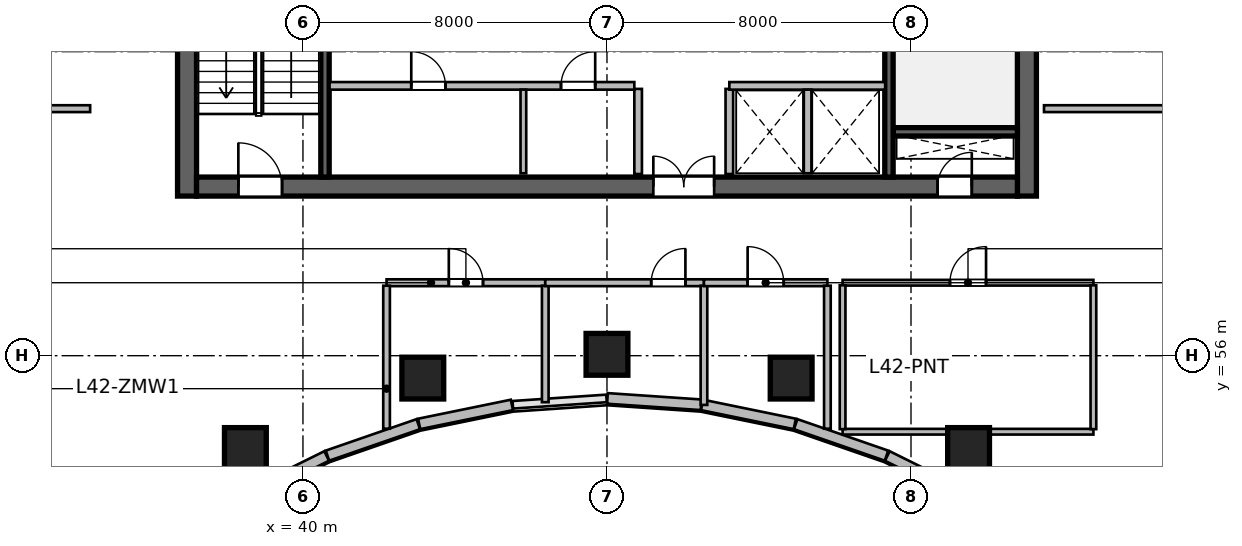
"""IFC4 building model, lengths in metres.
Left out: names, types, materials, properties, quantities, classifications, styles, units other than length and angle.
Written with IfcOpenShell. Run it as: python <this file> out.ifc"""

import sys

from ifc_helpers import new_model, si_unit, direction, frame, frame_2d, origin, origin_2d, place, context, subcontext, project, spatial, rectangle, circle, extrude, source, transform, mapped, element, fill, save


model = new_model("IFC4")
c1 = context("Model", 3, precision=1e-05, world=origin(), true_north=direction((0.0, 1.0)))
c2 = subcontext(c1, "Body", "Model", "MODEL_VIEW")
j1 = project(units=[si_unit("LENGTHUNIT", "METRE"), si_unit("PLANEANGLEUNIT", "RADIAN")], contexts=[c1])
p1 = place(None, origin())
s1 = spatial("IfcSite", under=j1, at=p1, CompositionType="ELEMENT")
p2 = place(p1, origin())
s2 = spatial("IfcBuilding", under=s1, at=p2, CompositionType="ELEMENT")
p3 = place(p2, frame((0.0, 0.0, 174.0)))
s3 = spatial("IfcBuildingStorey", under=s2, at=p3, CompositionType="ELEMENT", Elevation=174.0)
m1 = source(origin(), c2, "Body", "SweptSolid", [
    extrude(rectangle(XDim=12.0, YDim=0.5, at=frame_2d((6.0, 0.0))), origin(), (0.0, 0.0, 1.0), 3.9),
])
for number, where, z_axis, x_axis in (
    (1, (36.95, 60.2, 0.0), (0.0, 0.0, 1.0), (0.0, 1.0, 0.0)),
    (2, (59.05, 60.2, 0.0), (0.0, 0.0, 1.0), (0.0, 1.0, 0.0)),
):
    element("IfcWall", number, at=place(p3, frame(where, z_axis=z_axis, x_axis=x_axis)), inside=s3, PredefinedType="SHEAR", context=c2, shape_type="MappedRepresentation", body=[
        mapped(m1, transform((0.0, 0.0, 0.0), scale=1.0)),
    ])
m2 = source(origin(), c2, "Body", "SweptSolid", [
    extrude(rectangle(XDim=21.6, YDim=0.5, at=frame_2d((10.8, 0.0))), origin(), (0.0, 0.0, 1.0), 3.9),
])
p4 = place(p3, frame((37.2, 60.45, 0.0), z_axis=(0.0, 0.0, 1.0), x_axis=(1.0, 0.0, 0.0)))
e3 = element("IfcWall", 3, at=p4, inside=s3, PredefinedType="SHEAR", context=c2, shape_type="MappedRepresentation", body=[
    mapped(m2, transform((0.0, 0.0, 0.0), scale=1.0)),
])
p5 = place(p4, frame((1.1, 0.0, 0.0)))
e4 = element("IfcOpeningElement", 4, at=p5, cuts=e3, PredefinedType="OPENING", context=c2, shape_type="SweptSolid", body=[
    extrude(rectangle(XDim=1.15, YDim=2.15, at=frame_2d((0.575, 1.075))), frame((0.0, 0.26, 0.0), z_axis=(0.0, -1.0, 0.0), x_axis=(1.0, 0.0, 0.0)), (0.0, 0.0, 1.0), 0.52),
])
p6 = place(p4, frame((19.5, 0.0, 0.0)))
e5 = element("IfcOpeningElement", 5, at=p6, cuts=e3, PredefinedType="OPENING", context=c2, shape_type="SweptSolid", body=[
    extrude(rectangle(XDim=0.9, YDim=2.1, at=frame_2d((0.45, 1.05))), frame((0.0, 0.26, 0.0), z_axis=(0.0, -1.0, 0.0), x_axis=(1.0, 0.0, 0.0)), (0.0, 0.0, 1.0), 0.52),
])
p7 = place(p4, frame((12.02, 0.0, 0.0)))
e6 = element("IfcOpeningElement", 6, at=p7, cuts=e3, PredefinedType="OPENING", context=c2, shape_type="SweptSolid", body=[
    extrude(rectangle(XDim=1.6, YDim=2.15, at=frame_2d((0.8, 1.075))), frame((0.0, 0.26, 0.0), z_axis=(0.0, -1.0, 0.0), x_axis=(1.0, 0.0, 0.0)), (0.0, 0.0, 1.0), 0.52),
])
m3 = source(origin(), c2, "Body", "SweptSolid", [
    extrude(rectangle(XDim=3.27, YDim=0.22, at=frame_2d((1.635, 0.0))), origin(), (0.0, 0.0, 1.0), 3.9),
])
p8 = place(p3, frame((55.53, 61.89, 0.0), z_axis=(0.0, 0.0, 1.0), x_axis=(1.0, 0.0, 0.0)))
e7 = element("IfcWall", 7, at=p8, inside=s3, PredefinedType="SHEAR", context=c2, shape_type="MappedRepresentation", body=[
    mapped(m3, transform((0.0, 0.0, 0.0), scale=1.0)),
])
m4 = source(origin(), c2, "Body", "SweptSolid", [
    extrude(rectangle(XDim=11.0, YDim=0.22, at=frame_2d((5.5, 0.0))), origin(), (0.0, 0.0, 1.0), 3.9),
])
p9 = place(p3, frame((40.58, 60.7, 0.0), z_axis=(0.0, 0.0, 1.0), x_axis=(0.0, 1.0, 0.0)))
e8 = element("IfcWall", 8, at=p9, inside=s3, PredefinedType="SHEAR", context=c2, shape_type="MappedRepresentation", body=[
    mapped(m4, transform((0.0, 0.0, 0.0), scale=1.0)),
])
p10 = place(p3, frame((55.42, 60.7, 0.0), z_axis=(0.0, 0.0, 1.0), x_axis=(0.0, 1.0, 0.0)))
e9 = element("IfcWall", 9, at=p10, inside=s3, PredefinedType="SHEAR", context=c2, shape_type="MappedRepresentation", body=[
    mapped(m4, transform((0.0, 0.0, 0.0), scale=1.0)),
])
p11 = place(p10, frame((9.545, 0.0, 0.0)))
e10 = element("IfcOpeningElement", 10, at=p11, cuts=e9, PredefinedType="OPENING", context=c2, shape_type="SweptSolid", body=[
    extrude(rectangle(XDim=1.15, YDim=2.15, at=frame_2d((0.575, 1.075))), frame((0.0, 0.12, 0.0), z_axis=(0.0, -1.0, 0.0), x_axis=(1.0, 0.0, 0.0)), (0.0, 0.0, 1.0), 0.24),
])
m5 = source(origin(), c2, "Body", "SweptSolid", [
    extrude(circle(Radius=0.55, at=origin_2d()), origin(), (0.0, 0.0, 1.0), 3.9),
])
for number, where, z_axis, x_axis in (
    (11, (38.485, 53.558, 0.0), (0.0, 0.0, 1.0), (-0.289, 0.957, 0.0)),
    (12, (43.154, 55.411, 0.0), (0.0, 0.0, 1.0), (-0.143, 0.99, 0.0)),
    (13, (48.0, 56.036, 0.0), (0.0, 0.0, 1.0), (0.0, 1.0, 0.0)),
    (14, (52.846, 55.411, 0.0), (0.0, 0.0, 1.0), (0.143, 0.99, 0.0)),
    (15, (57.515, 53.558, 0.0), (0.0, 0.0, 1.0), (0.289, 0.957, 0.0)),
):
    element("IfcColumn", number, at=place(p3, frame(where, z_axis=z_axis, x_axis=x_axis)), inside=s3, PredefinedType="COLUMN", context=c2, shape_type="MappedRepresentation", body=[
        mapped(m5, transform((0.0, 0.0, 0.0), scale=1.0)),
    ])
m6 = source(origin(), c2, "Body", "SweptSolid", [
    extrude(rectangle(XDim=2.584, YDim=0.28, at=frame_2d((1.292, 0.0))), origin(), (0.0, 0.0, 1.0), 3.65),
])
p12 = place(p3, frame((57.692, 52.213, 0.0), z_axis=(0.0, 0.0, 1.0), x_axis=(-0.895989792847, 0.44407464588, 0.0)))
e16 = element("IfcWall", 16, at=p12, inside=s3, PredefinedType="SOLIDWALL", context=c2, shape_type="MappedRepresentation", body=[
    mapped(m6, transform((0.0, 0.0, 0.0), scale=1.0)),
])
m7 = source(origin(), c2, "Body", "SweptSolid", [
    extrude(rectangle(XDim=2.53, YDim=0.28, at=frame_2d((1.265, 0.0))), origin(), (0.0, 0.0, 1.0), 3.65),
])
p13 = place(p3, frame((55.355, 53.37, 0.0), z_axis=(0.0, 0.0, 1.0), x_axis=(-0.944872429646, 0.327438683872, 0.0)))
e17 = element("IfcWall", 17, at=p13, inside=s3, PredefinedType="SOLIDWALL", context=c2, shape_type="MappedRepresentation", body=[
    mapped(m7, transform((0.0, 0.0, 0.0), scale=1.0)),
])
m8 = source(origin(), c2, "Body", "SweptSolid", [
    extrude(rectangle(XDim=2.491, YDim=0.28, at=frame_2d((1.246, 0.0))), origin(), (0.0, 0.0, 1.0), 3.65),
])
p14 = place(p3, frame((52.942, 54.205, 0.0), z_axis=(0.0, 0.0, 1.0), x_axis=(-0.979630885979, 0.200806691214, 0.0)))
e18 = element("IfcWall", 18, at=p14, inside=s3, PredefinedType="SOLIDWALL", context=c2, shape_type="MappedRepresentation", body=[
    mapped(m8, transform((0.0, 0.0, 0.0), scale=1.0)),
])
m9 = source(origin(), c2, "Body", "SweptSolid", [
    extrude(rectangle(XDim=2.471, YDim=0.28, at=frame_2d((1.236, 0.0))), origin(), (0.0, 0.0, 1.0), 3.65),
])
p15 = place(p3, frame((50.478, 54.708, 0.0), z_axis=(0.0, 0.0, 1.0), x_axis=(-0.997708006929, 0.067666335123, 0.0)))
e19 = element("IfcWall", 19, at=p15, inside=s3, PredefinedType="SOLIDWALL", context=c2, shape_type="MappedRepresentation", body=[
    mapped(m9, transform((0.0, 0.0, 0.0), scale=1.0)),
])
p16 = place(p3, frame((45.498, 54.705, 0.0), z_axis=(0.0, 0.0, 1.0), x_axis=(-0.979630885979, -0.200806691214, 0.0)))
e20 = element("IfcWall", 20, at=p16, inside=s3, PredefinedType="SOLIDWALL", context=c2, shape_type="MappedRepresentation", body=[
    mapped(m8, transform((0.0, 0.0, 0.0), scale=1.0)),
])
p17 = place(p3, frame((43.035, 54.198, 0.0), z_axis=(0.0, 0.0, 1.0), x_axis=(-0.944872429646, -0.327438683872, 0.0)))
e21 = element("IfcWall", 21, at=p17, inside=s3, PredefinedType="SOLIDWALL", context=c2, shape_type="MappedRepresentation", body=[
    mapped(m7, transform((0.0, 0.0, 0.0), scale=1.0)),
])
p18 = place(p3, frame((40.624, 53.361, 0.0), z_axis=(0.0, 0.0, 1.0), x_axis=(-0.895989792847, -0.44407464588, 0.0)))
e22 = element("IfcWall", 22, at=p18, inside=s3, PredefinedType="SOLIDWALL", context=c2, shape_type="MappedRepresentation", body=[
    mapped(m6, transform((0.0, 0.0, 0.0), scale=1.0)),
])
m10 = source(origin(), c2, "Body", "SweptSolid", [
    extrude(rectangle(XDim=2.24, YDim=0.2, at=frame_2d((1.12, 0.0))), origin(), (0.0, 0.0, 1.0), 3.65),
])
for number, where, z_axis, x_axis in (
    (23, (48.82, 60.78, 0.0), (0.0, 0.0, 1.0), (0.0, 1.0, 0.0)),
    (24, (51.22, 60.78, 0.0), (0.0, 0.0, 1.0), (0.0, 1.0, 0.0)),
):
    element("IfcWall", number, at=place(p3, frame(where, z_axis=z_axis, x_axis=x_axis)), inside=s3, PredefinedType="SOLIDWALL", context=c2, shape_type="MappedRepresentation", body=[
        mapped(m10, transform((0.0, 0.0, 0.0), scale=1.0)),
    ])
m11 = source(origin(), c2, "Body", "SweptSolid", [
    extrude(rectangle(XDim=8.02, YDim=0.2, at=frame_2d((4.01, 0.0))), origin(), (0.0, 0.0, 1.0), 3.65),
])
p19 = place(p3, frame((40.7, 63.1, 0.0), z_axis=(0.0, 0.0, 1.0), x_axis=(1.0, 0.0, 0.0)))
e25 = element("IfcWall", 25, at=p19, inside=s3, PredefinedType="SOLIDWALL", context=c2, shape_type="MappedRepresentation", body=[
    mapped(m11, transform((0.0, 0.0, 0.0), scale=1.0)),
])
p20 = place(p19, frame((2.15, 0.0, 0.0)))
e26 = element("IfcOpeningElement", 26, at=p20, cuts=e25, PredefinedType="OPENING", context=c2, shape_type="SweptSolid", body=[
    extrude(rectangle(XDim=0.9, YDim=2.1, at=frame_2d((0.45, 1.05))), frame((0.0, 0.11, 0.0), z_axis=(0.0, -1.0, 0.0), x_axis=(1.0, 0.0, 0.0)), (0.0, 0.0, 1.0), 0.22),
])
p21 = place(p19, frame((6.09, 0.0, 0.0)))
e27 = element("IfcOpeningElement", 27, at=p21, cuts=e25, PredefinedType="OPENING", context=c2, shape_type="SweptSolid", body=[
    extrude(rectangle(XDim=0.9, YDim=2.1, at=frame_2d((0.45, 1.05))), frame((0.0, 0.11, 0.0), z_axis=(0.0, -1.0, 0.0), x_axis=(1.0, 0.0, 0.0)), (0.0, 0.0, 1.0), 0.22),
])
m12 = source(origin(), c2, "Body", "SweptSolid", [
    extrude(rectangle(XDim=4.1, YDim=0.2, at=frame_2d((2.05, 0.0))), origin(), (0.0, 0.0, 1.0), 3.65),
])
p22 = place(p3, frame((51.22, 63.1, 0.0), z_axis=(0.0, 0.0, 1.0), x_axis=(1.0, 0.0, 0.0)))
e28 = element("IfcWall", 28, at=p22, inside=s3, PredefinedType="SOLIDWALL", context=c2, shape_type="MappedRepresentation", body=[
    mapped(m12, transform((0.0, 0.0, 0.0), scale=1.0)),
])
m13 = source(origin(), c2, "Body", "SweptSolid", [
    extrude(rectangle(XDim=2.2, YDim=0.15, at=frame_2d((1.1, 0.0))), origin(), (0.0, 0.0, 1.0), 3.65),
])
p23 = place(p3, frame((45.8, 60.8, 0.0), z_axis=(0.0, 0.0, 1.0), x_axis=(0.0, 1.0, 0.0)))
e29 = element("IfcWall", 29, at=p23, inside=s3, PredefinedType="PARTITIONING", context=c2, shape_type="MappedRepresentation", body=[
    mapped(m13, transform((0.0, 0.0, 0.0), scale=1.0)),
])
m14 = source(origin(), c2, "Body", "SweptSolid", [
    extrude(rectangle(XDim=2.2, YDim=0.2, at=frame_2d((1.1, 0.0))), origin(), (0.0, 0.0, 1.0), 3.65),
])
p24 = place(p3, frame((53.28, 60.8, 0.0), z_axis=(0.0, 0.0, 1.0), x_axis=(0.0, 1.0, 0.0)))
e30 = element("IfcWall", 30, at=p24, inside=s3, PredefinedType="SOLIDWALL", context=c2, shape_type="MappedRepresentation", body=[
    mapped(m14, transform((0.0, 0.0, 0.0), scale=1.0)),
])
m15 = source(origin(), c2, "Body", "SweptSolid", [
    extrude(rectangle(XDim=4.176, YDim=0.18, at=frame_2d((2.088, 0.0))), origin(), (0.0, 0.0, 1.0), 3.65),
])
p25 = place(p3, frame((42.2, 57.92, 0.0), z_axis=(0.0, 0.0, 1.0), x_axis=(1.0, 0.0, 0.0)))
e31 = element("IfcWall", 31, at=p25, inside=s3, PredefinedType="PLUMBINGWALL", context=c2, shape_type="MappedRepresentation", body=[
    mapped(m15, transform((0.0, 0.0, 0.0), scale=1.0)),
])
p26 = place(p25, frame((1.638, 0.0, 0.0)))
e32 = element("IfcOpeningElement", 32, at=p26, cuts=e31, PredefinedType="OPENING", context=c2, shape_type="SweptSolid", body=[
    extrude(rectangle(XDim=0.9, YDim=2.08, at=frame_2d((0.45, 1.04))), frame((0.0, 0.1, 0.0), z_axis=(0.0, -1.0, 0.0), x_axis=(1.0, 0.0, 0.0)), (0.0, 0.0, 1.0), 0.2),
])
m16 = source(origin(), c2, "Body", "SweptSolid", [
    extrude(rectangle(XDim=3.763, YDim=0.175, at=frame_2d((1.881, 0.0))), origin(), (0.0, 0.0, 1.0), 3.65),
])
p27 = place(p3, frame((42.2, 54.079, 0.0), z_axis=(0.0, 0.0, 1.0), x_axis=(0.0, 1.0, 0.0)))
e33 = element("IfcWall", 33, at=p27, inside=s3, PredefinedType="PARTITIONING", context=c2, shape_type="MappedRepresentation", body=[
    mapped(m16, transform((0.0, 0.0, 0.0), scale=1.0)),
])
m17 = source(origin(), c2, "Body", "SweptSolid", [
    extrude(rectangle(XDim=3.065, YDim=0.175, at=frame_2d((1.533, 0.0))), origin(), (0.0, 0.0, 1.0), 3.65),
])
p28 = place(p3, frame((46.376, 54.776, 0.0), z_axis=(0.0, 0.0, 1.0), x_axis=(0.0, 1.0, 0.0)))
e34 = element("IfcWall", 34, at=p28, inside=s3, PredefinedType="PARTITIONING", context=c2, shape_type="MappedRepresentation", body=[
    mapped(m17, transform((0.0, 0.0, 0.0), scale=1.0)),
])
p29 = place(p3, frame((46.376, 57.92, 0.0), z_axis=(0.0, 0.0, 1.0), x_axis=(1.0, 0.0, 0.0)))
e35 = element("IfcWall", 35, at=p29, inside=s3, PredefinedType="PLUMBINGWALL", context=c2, shape_type="MappedRepresentation", body=[
    mapped(m15, transform((0.0, 0.0, 0.0), scale=1.0)),
])
p30 = place(p29, frame((2.788, 0.0, 0.0)))
e36 = element("IfcOpeningElement", 36, at=p30, cuts=e35, PredefinedType="OPENING", context=c2, shape_type="SweptSolid", body=[
    extrude(rectangle(XDim=0.9, YDim=2.08, at=frame_2d((0.45, 1.04))), frame((0.0, 0.1, 0.0), z_axis=(0.0, -1.0, 0.0), x_axis=(1.0, 0.0, 0.0)), (0.0, 0.0, 1.0), 0.2),
])
m18 = source(origin(), c2, "Body", "SweptSolid", [
    extrude(rectangle(XDim=3.136, YDim=0.175, at=frame_2d((1.568, 0.0))), origin(), (0.0, 0.0, 1.0), 3.65),
])
p31 = place(p3, frame((50.552, 54.705, 0.0), z_axis=(0.0, 0.0, 1.0), x_axis=(0.0, 1.0, 0.0)))
e37 = element("IfcWall", 37, at=p31, inside=s3, PredefinedType="PARTITIONING", context=c2, shape_type="MappedRepresentation", body=[
    mapped(m18, transform((0.0, 0.0, 0.0), scale=1.0)),
])
m19 = source(origin(), c2, "Body", "SweptSolid", [
    extrude(rectangle(XDim=3.248, YDim=0.18, at=frame_2d((1.624, 0.0))), origin(), (0.0, 0.0, 1.0), 3.65),
])
p32 = place(p3, frame((50.552, 57.92, 0.0), z_axis=(0.0, 0.0, 1.0), x_axis=(1.0, 0.0, 0.0)))
e38 = element("IfcWall", 38, at=p32, inside=s3, PredefinedType="PLUMBINGWALL", context=c2, shape_type="MappedRepresentation", body=[
    mapped(m19, transform((0.0, 0.0, 0.0), scale=1.0)),
])
p33 = place(p32, frame((1.149, 0.0, 0.0)))
e39 = element("IfcOpeningElement", 39, at=p33, cuts=e38, PredefinedType="OPENING", context=c2, shape_type="SweptSolid", body=[
    extrude(rectangle(XDim=0.95, YDim=2.12, at=frame_2d((0.475, 1.06))), frame((0.0, 0.1, 0.0), z_axis=(0.0, -1.0, 0.0), x_axis=(1.0, 0.0, 0.0)), (0.0, 0.0, 1.0), 0.2),
])
p34 = place(p3, frame((53.8, 54.079, 0.0), z_axis=(0.0, 0.0, 1.0), x_axis=(0.0, 1.0, 0.0)))
e40 = element("IfcWall", 40, at=p34, inside=s3, PredefinedType="PARTITIONING", context=c2, shape_type="MappedRepresentation", body=[
    mapped(m16, transform((0.0, 0.0, 0.0), scale=1.0)),
])
m20 = source(origin(), c2, "Body", "SweptSolid", [
    extrude(rectangle(XDim=6.6, YDim=0.15, at=frame_2d((3.3, 0.0))), origin(), (0.0, 0.0, 1.0), 3.095),
])
p35 = place(p3, frame((54.2, 54.0, 0.0), z_axis=(0.0, 0.0, 1.0), x_axis=(1.0, 0.0, 0.0)))
e41 = element("IfcWall", 41, at=p35, inside=s3, PredefinedType="PARTITIONING", context=c2, shape_type="MappedRepresentation", body=[
    mapped(m20, transform((0.0, 0.0, 0.0), scale=1.0)),
])
m21 = source(origin(), c2, "Body", "SweptSolid", [
    extrude(rectangle(XDim=6.6, YDim=0.15, at=frame_2d((3.3, 0.0))), origin(), (0.0, 0.0, 1.0), 3.65),
])
p36 = place(p3, frame((54.2, 57.92, 0.0), z_axis=(0.0, 0.0, 1.0), x_axis=(1.0, 0.0, 0.0)))
e42 = element("IfcWall", 42, at=p36, inside=s3, PredefinedType="PARTITIONING", context=c2, shape_type="MappedRepresentation", body=[
    mapped(m21, transform((0.0, 0.0, 0.0), scale=1.0)),
])
p37 = place(p36, frame((2.825, 0.0, 0.0)))
e43 = element("IfcOpeningElement", 43, at=p37, cuts=e42, PredefinedType="OPENING", context=c2, shape_type="SweptSolid", body=[
    extrude(rectangle(XDim=0.95, YDim=2.1, at=frame_2d((0.475, 1.05))), frame((0.0, 0.085, 0.0), z_axis=(0.0, -1.0, 0.0), x_axis=(1.0, 0.0, 0.0)), (0.0, 0.0, 1.0), 0.17),
])
m22 = source(origin(), c2, "Body", "SweptSolid", [
    extrude(rectangle(XDim=3.785, YDim=0.15, at=frame_2d((1.893, 0.0))), origin(), (0.0, 0.0, 1.0), 3.65),
])
for number, where, z_axis, x_axis in (
    (44, (54.2, 54.067, 0.0), (0.0, 0.0, 1.0), (0.0, 1.0, 0.0)),
    (45, (60.8, 54.067, 0.0), (0.0, 0.0, 1.0), (0.0, 1.0, 0.0)),
):
    element("IfcWall", number, at=place(p3, frame(where, z_axis=z_axis, x_axis=x_axis)), inside=s3, PredefinedType="PARTITIONING", context=c2, shape_type="MappedRepresentation", body=[
        mapped(m22, transform((0.0, 0.0, 0.0), scale=1.0)),
    ])
m23 = source(origin(), c2, "Body", "SweptSolid", [
    extrude(rectangle(XDim=2.86, YDim=0.18, at=frame_2d((1.43, 0.0))), origin(), (0.0, 0.0, 1.0), 3.65),
])
p38 = place(p3, frame((31.54, 62.5, 0.0), z_axis=(0.0, 0.0, 1.0), x_axis=(1.0, 0.0, 0.0)))
e46 = element("IfcWall", 46, at=p38, inside=s3, PredefinedType="PLUMBINGWALL", context=c2, shape_type="MappedRepresentation", body=[
    mapped(m23, transform((0.0, 0.0, 0.0), scale=1.0)),
])
m24 = source(origin(), c2, "Body", "SweptSolid", [
    extrude(rectangle(XDim=4.96, YDim=0.18, at=frame_2d((2.48, 0.0))), origin(), (0.0, 0.0, 1.0), 3.65),
])
p39 = place(p3, frame((59.5, 62.5, 0.0), z_axis=(0.0, 0.0, 1.0), x_axis=(1.0, 0.0, 0.0)))
e47 = element("IfcWall", 47, at=p39, inside=s3, PredefinedType="PLUMBINGWALL", context=c2, shape_type="MappedRepresentation", body=[
    mapped(m24, transform((0.0, 0.0, 0.0), scale=1.0)),
])
m25 = source(origin(), c2, "Body", "SweptSolid", [
    extrude(rectangle(XDim=1.15, YDim=2.15, at=frame_2d((0.575, 1.075))), frame((0.0, 0.025, 0.0), z_axis=(0.0, -1.0, 0.0), x_axis=(1.0, 0.0, 0.0)), (0.0, 0.0, 1.0), 0.05),
])
p40 = place(p5, origin())
e48 = element("IfcDoor", 48, at=p40, inside=s3, OperationType="SINGLE_SWING_LEFT", PredefinedType="DOOR", context=c2, shape_type="MappedRepresentation", body=[
    mapped(m25, transform((0.0, 0.0, 0.0), scale=1.0)),
])
fill(e4, e48)
m26 = source(origin(), c2, "Body", "SweptSolid", [
    extrude(rectangle(XDim=0.9, YDim=2.1, at=frame_2d((0.45, 1.05))), frame((0.0, 0.025, 0.0), z_axis=(0.0, -1.0, 0.0), x_axis=(1.0, 0.0, 0.0)), (0.0, 0.0, 1.0), 0.05),
])
p41 = place(p6, origin())
e49 = element("IfcDoor", 49, at=p41, inside=s3, OperationType="SINGLE_SWING_RIGHT", PredefinedType="DOOR", context=c2, shape_type="MappedRepresentation", body=[
    mapped(m26, transform((0.0, 0.0, 0.0), scale=1.0)),
])
fill(e5, e49)
m27 = source(origin(), c2, "Body", "SweptSolid", [
    extrude(rectangle(XDim=1.6, YDim=2.15, at=frame_2d((0.8, 1.075))), frame((0.0, 0.025, 0.0), z_axis=(0.0, -1.0, 0.0), x_axis=(1.0, 0.0, 0.0)), (0.0, 0.0, 1.0), 0.05),
])
p42 = place(p7, origin())
e50 = element("IfcDoor", 50, at=p42, inside=s3, OperationType="DOUBLE_DOOR_SINGLE_SWING", PredefinedType="DOOR", context=c2, shape_type="MappedRepresentation", body=[
    mapped(m27, transform((0.0, 0.0, 0.0), scale=1.0)),
])
fill(e6, e50)
p43 = place(p20, origin())
e51 = element("IfcDoor", 51, at=p43, inside=s3, OperationType="SINGLE_SWING_LEFT", PredefinedType="DOOR", context=c2, shape_type="MappedRepresentation", body=[
    mapped(m26, transform((0.0, 0.0, 0.0), scale=1.0)),
])
fill(e26, e51)
p44 = place(p21, origin())
e52 = element("IfcDoor", 52, at=p44, inside=s3, OperationType="SINGLE_SWING_RIGHT", PredefinedType="DOOR", context=c2, shape_type="MappedRepresentation", body=[
    mapped(m26, transform((0.0, 0.0, 0.0), scale=1.0)),
])
fill(e27, e52)
m28 = source(origin(), c2, "Body", "SweptSolid", [
    extrude(rectangle(XDim=0.9, YDim=2.08, at=frame_2d((0.45, 1.04))), frame((0.0, 0.025, 0.0), z_axis=(0.0, -1.0, 0.0), x_axis=(1.0, 0.0, 0.0)), (0.0, 0.0, 1.0), 0.05),
])
p45 = place(p26, origin())
e53 = element("IfcDoor", 53, at=p45, inside=s3, OperationType="SINGLE_SWING_LEFT", PredefinedType="DOOR", context=c2, shape_type="MappedRepresentation", body=[
    mapped(m28, transform((0.0, 0.0, 0.0), scale=1.0)),
])
fill(e32, e53)
p46 = place(p30, origin())
e54 = element("IfcDoor", 54, at=p46, inside=s3, OperationType="SINGLE_SWING_RIGHT", PredefinedType="DOOR", context=c2, shape_type="MappedRepresentation", body=[
    mapped(m28, transform((0.0, 0.0, 0.0), scale=1.0)),
])
fill(e36, e54)
m29 = source(origin(), c2, "Body", "SweptSolid", [
    extrude(rectangle(XDim=0.95, YDim=2.12, at=frame_2d((0.475, 1.06))), frame((0.0, 0.025, 0.0), z_axis=(0.0, -1.0, 0.0), x_axis=(1.0, 0.0, 0.0)), (0.0, 0.0, 1.0), 0.05),
])
p47 = place(p33, origin())
e55 = element("IfcDoor", 55, at=p47, inside=s3, OperationType="SINGLE_SWING_LEFT", PredefinedType="DOOR", context=c2, shape_type="MappedRepresentation", body=[
    mapped(m29, transform((0.0, 0.0, 0.0), scale=1.0)),
])
fill(e39, e55)
m30 = source(origin(), c2, "Body", "SweptSolid", [
    extrude(rectangle(XDim=0.95, YDim=2.1, at=frame_2d((0.475, 1.05))), frame((0.0, 0.025, 0.0), z_axis=(0.0, -1.0, 0.0), x_axis=(1.0, 0.0, 0.0)), (0.0, 0.0, 1.0), 0.05),
])
p48 = place(p37, origin())
e56 = element("IfcDoor", 56, at=p48, inside=s3, OperationType="SINGLE_SWING_RIGHT", PredefinedType="DOOR", context=c2, shape_type="MappedRepresentation", body=[
    mapped(m30, transform((0.0, 0.0, 0.0), scale=1.0)),
])
fill(e43, e56)
save(model, sys.argv[1])
